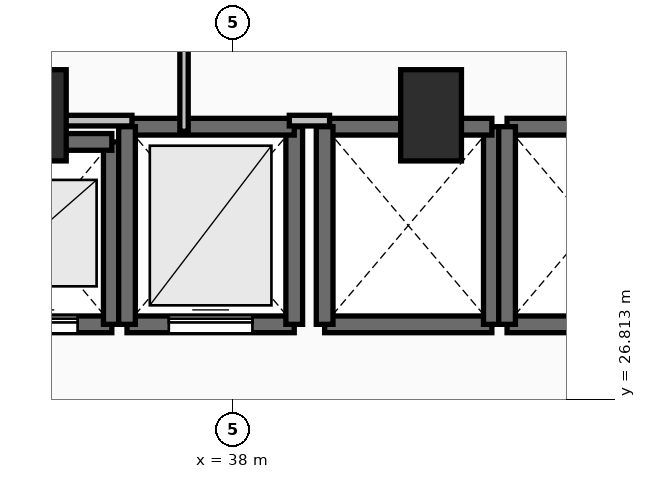
"""IFC4 building model, lengths in metres.
Left out: names, types, materials, properties, quantities, classifications, styles, units other than length and angle.
Written with IfcOpenShell. Run it as: python <this file> out.ifc"""

import sys

from ifc_helpers import new_model, si_unit, direction, frame, frame_2d, origin, origin_2d, place, context, subcontext, project, spatial, rectangle, extrude, element, fill, save


model = new_model("IFC4")
c1 = context("Model", 3, precision=1e-05, world=origin(), true_north=direction((0.0, 1.0)))
c2 = subcontext(c1, "Body", "Model", "MODEL_VIEW")
j1 = project(units=[si_unit("LENGTHUNIT", "METRE"), si_unit("PLANEANGLEUNIT", "RADIAN")], contexts=[c1])
p1 = place(None, origin())
s1 = spatial("IfcSite", under=j1, at=p1, CompositionType="ELEMENT")
p2 = place(p1, origin())
s2 = spatial("IfcBuilding", under=s1, at=p2, CompositionType="ELEMENT")
p3 = place(p2, frame((0.0, 0.0, 92.8)))
s3 = spatial("IfcBuildingStorey", under=s2, at=p3, CompositionType="ELEMENT", Elevation=92.8)
for number, where, z_axis, x_axis in (
    (1, (35.4, 30.55, 0.0), (0.0, 0.0, 1.0), (1.0, 0.0, 0.0)),
    (2, (40.6, 30.55, 0.0), (0.0, 0.0, 1.0), (1.0, 0.0, 0.0)),
):
    element("IfcColumn", number, at=place(p3, frame(where, z_axis=z_axis, x_axis=x_axis)), inside=s3, PredefinedType="PILASTER", context=c2, shape_type="SweptSolid", body=[
        extrude(rectangle(XDim=0.8, YDim=1.2, at=origin_2d()), origin(), (0.0, 0.0, 1.0), 3.5),
    ])
p4 = place(p3, frame((34.4, 27.8, 0.0), z_axis=(0.0, 0.0, 1.0), x_axis=(1.0, 0.0, 0.0)))
e3 = element("IfcWall", 3, at=p4, inside=s3, PredefinedType="SOLIDWALL", context=c2, shape_type="SweptSolid", body=[
    extrude(rectangle(XDim=2.0, YDim=0.22, at=frame_2d((1.0, 0.0))), origin(), (0.0, 0.0, 1.0), 3.24),
])
p5 = place(p4, frame((0.45, 0.0, 0.0)))
e4 = element("IfcOpeningElement", 4, at=p5, cuts=e3, PredefinedType="OPENING", context=c2, shape_type="SweptSolid", body=[
    extrude(rectangle(XDim=1.1, YDim=2.2, at=frame_2d((0.55, 1.1))), frame((0.0, 0.125, 0.0), z_axis=(0.0, -1.0, 0.0), x_axis=(1.0, 0.0, 0.0)), (0.0, 0.0, 1.0), 0.25),
])
p6 = place(p3, frame((36.4, 27.8, 0.0), z_axis=(0.0, 0.0, 1.0), x_axis=(0.0, 1.0, 0.0)))
e5 = element("IfcWall", 5, at=p6, inside=s3, PredefinedType="SOLIDWALL", context=c2, shape_type="SweptSolid", body=[
    extrude(rectangle(XDim=2.4, YDim=0.22, at=frame_2d((1.2, 0.0))), origin(), (0.0, 0.0, 1.0), 3.24),
])
p7 = place(p3, frame((36.4, 30.2, 0.0), z_axis=(0.0, 0.0, 1.0), x_axis=(-1.0, 0.0, 0.0)))
e6 = element("IfcWall", 6, at=p7, inside=s3, PredefinedType="SOLIDWALL", context=c2, shape_type="SweptSolid", body=[
    extrude(rectangle(XDim=2.0, YDim=0.22, at=frame_2d((1.0, 0.0))), origin(), (0.0, 0.0, 1.0), 3.24),
])
p8 = place(p3, frame((36.6, 27.8, 0.0), z_axis=(0.0, 0.0, 1.0), x_axis=(1.0, 0.0, 0.0)))
e7 = element("IfcWall", 7, at=p8, inside=s3, PredefinedType="SOLIDWALL", context=c2, shape_type="SweptSolid", body=[
    extrude(rectangle(XDim=2.2, YDim=0.22, at=frame_2d((1.1, 0.0))), origin(), (0.0, 0.0, 1.0), 3.24),
])
p9 = place(p8, frame((0.55, 0.0, 0.0)))
e8 = element("IfcOpeningElement", 8, at=p9, cuts=e7, PredefinedType="OPENING", context=c2, shape_type="SweptSolid", body=[
    extrude(rectangle(XDim=1.1, YDim=2.2, at=frame_2d((0.55, 1.1))), frame((0.0, 0.125, 0.0), z_axis=(0.0, -1.0, 0.0), x_axis=(1.0, 0.0, 0.0)), (0.0, 0.0, 1.0), 0.25),
])
p10 = place(p3, frame((38.8, 27.8, 0.0), z_axis=(0.0, 0.0, 1.0), x_axis=(0.0, 1.0, 0.0)))
e9 = element("IfcWall", 9, at=p10, inside=s3, PredefinedType="SOLIDWALL", context=c2, shape_type="SweptSolid", body=[
    extrude(rectangle(XDim=2.6, YDim=0.22, at=frame_2d((1.3, 0.0))), origin(), (0.0, 0.0, 1.0), 3.24),
])
p11 = place(p3, frame((38.8, 30.4, 0.0), z_axis=(0.0, 0.0, 1.0), x_axis=(-1.0, 0.0, 0.0)))
e10 = element("IfcWall", 10, at=p11, inside=s3, PredefinedType="SOLIDWALL", context=c2, shape_type="SweptSolid", body=[
    extrude(rectangle(XDim=2.2, YDim=0.22, at=frame_2d((1.1, 0.0))), origin(), (0.0, 0.0, 1.0), 3.24),
])
p12 = place(p3, frame((36.6, 30.4, 0.0), z_axis=(0.0, 0.0, 1.0), x_axis=(0.0, -1.0, 0.0)))
e11 = element("IfcWall", 11, at=p12, inside=s3, PredefinedType="SOLIDWALL", context=c2, shape_type="SweptSolid", body=[
    extrude(rectangle(XDim=2.6, YDim=0.22, at=frame_2d((1.3, 0.0))), origin(), (0.0, 0.0, 1.0), 3.24),
])
p13 = place(p3, frame((39.2, 27.8, 0.0), z_axis=(0.0, 0.0, 1.0), x_axis=(1.0, 0.0, 0.0)))
e12 = element("IfcWall", 12, at=p13, inside=s3, PredefinedType="SOLIDWALL", context=c2, shape_type="SweptSolid", body=[
    extrude(rectangle(XDim=2.2, YDim=0.22, at=frame_2d((1.1, 0.0))), origin(), (0.0, 0.0, 1.0), 3.24),
])
p14 = place(p3, frame((41.4, 27.8, 0.0), z_axis=(0.0, 0.0, 1.0), x_axis=(0.0, 1.0, 0.0)))
e13 = element("IfcWall", 13, at=p14, inside=s3, PredefinedType="SOLIDWALL", context=c2, shape_type="SweptSolid", body=[
    extrude(rectangle(XDim=2.6, YDim=0.22, at=frame_2d((1.3, 0.0))), origin(), (0.0, 0.0, 1.0), 3.24),
])
p15 = place(p3, frame((41.4, 30.4, 0.0), z_axis=(0.0, 0.0, 1.0), x_axis=(-1.0, 0.0, 0.0)))
e14 = element("IfcWall", 14, at=p15, inside=s3, PredefinedType="SOLIDWALL", context=c2, shape_type="SweptSolid", body=[
    extrude(rectangle(XDim=2.2, YDim=0.22, at=frame_2d((1.1, 0.0))), origin(), (0.0, 0.0, 1.0), 3.24),
])
p16 = place(p3, frame((39.2, 30.4, 0.0), z_axis=(0.0, 0.0, 1.0), x_axis=(0.0, -1.0, 0.0)))
e15 = element("IfcWall", 15, at=p16, inside=s3, PredefinedType="SOLIDWALL", context=c2, shape_type="SweptSolid", body=[
    extrude(rectangle(XDim=2.6, YDim=0.22, at=frame_2d((1.3, 0.0))), origin(), (0.0, 0.0, 1.0), 3.24),
])
for number, where, z_axis, x_axis in (
    (16, (41.6, 27.8, 0.0), (0.0, 0.0, 1.0), (1.0, 0.0, 0.0)),
    (17, (43.8, 30.4, 0.0), (0.0, 0.0, 1.0), (-1.0, 0.0, 0.0)),
):
    element("IfcWall", number, at=place(p3, frame(where, z_axis=z_axis, x_axis=x_axis)), inside=s3, PredefinedType="SOLIDWALL", context=c2, shape_type="SweptSolid", body=[
        extrude(rectangle(XDim=2.2, YDim=0.22, at=frame_2d((1.1, 0.0))), origin(), (0.0, 0.0, 1.0), 3.24),
    ])
p17 = place(p3, frame((41.6, 30.4, 0.0), z_axis=(0.0, 0.0, 1.0), x_axis=(0.0, -1.0, 0.0)))
e18 = element("IfcWall", 18, at=p17, inside=s3, PredefinedType="SOLIDWALL", context=c2, shape_type="SweptSolid", body=[
    extrude(rectangle(XDim=2.6, YDim=0.22, at=frame_2d((1.3, 0.0))), origin(), (0.0, 0.0, 1.0), 3.24),
])
p18 = place(p3, frame((37.35, 30.34, 0.0), z_axis=(0.0, 0.0, 1.0), x_axis=(0.0, 1.0, 0.0)))
e19 = element("IfcWall", 19, at=p18, inside=s3, PredefinedType="PARTITIONING", context=c2, shape_type="SweptSolid", body=[
    extrude(rectangle(XDim=3.56, YDim=0.11, at=frame_2d((1.78, 0.0))), origin(), (0.0, 0.0, 1.0), 2.432),
])
p19 = place(p3, frame((33.44, 30.48, 0.0), z_axis=(0.0, 0.0, 1.0), x_axis=(1.0, 0.0, 0.0)))
e20 = element("IfcWall", 20, at=p19, inside=s3, PredefinedType="PARTITIONING", context=c2, shape_type="SweptSolid", body=[
    extrude(rectangle(XDim=3.225, YDim=0.14, at=frame_2d((1.613, 0.0))), origin(), (0.0, 0.0, 1.0), 2.432),
])
p20 = place(p3, frame((38.735, 30.48, 0.0), z_axis=(0.0, 0.0, 1.0), x_axis=(1.0, 0.0, 0.0)))
e21 = element("IfcWall", 21, at=p20, inside=s3, PredefinedType="PARTITIONING", context=c2, shape_type="SweptSolid", body=[
    extrude(rectangle(XDim=0.53, YDim=0.14, at=frame_2d((0.265, 0.0))), origin(), (0.0, 0.0, 1.0), 2.432),
])
p21 = place(p5, origin())
e22 = element("IfcDoor", 22, at=p21, inside=s3, OperationType="SLIDING_TO_LEFT", PredefinedType="DOOR", context=c2, shape_type="SweptSolid", body=[
    extrude(rectangle(XDim=1.1, YDim=2.2, at=frame_2d((0.55, 1.1))), frame((0.0, 0.025, 0.0), z_axis=(0.0, -1.0, 0.0), x_axis=(1.0, 0.0, 0.0)), (0.0, 0.0, 1.0), 0.05),
])
fill(e4, e22)
p22 = place(p9, origin())
e23 = element("IfcDoor", 23, at=p22, inside=s3, OperationType="SLIDING_TO_LEFT", PredefinedType="DOOR", context=c2, shape_type="SweptSolid", body=[
    extrude(rectangle(XDim=1.1, YDim=2.2, at=frame_2d((0.55, 1.1))), frame((0.0, 0.025, 0.0), z_axis=(0.0, -1.0, 0.0), x_axis=(1.0, 0.0, 0.0)), (0.0, 0.0, 1.0), 0.05),
])
fill(e8, e23)
save(model, sys.argv[1])
